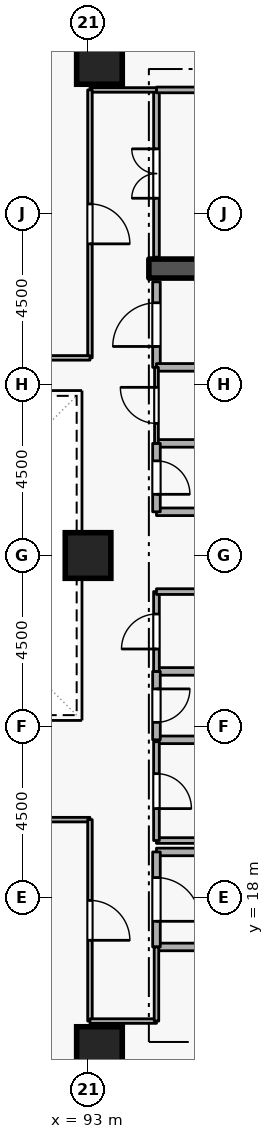
"""IFC4 building model, lengths in metres.
Left out: names, types, materials, properties, quantities, classifications, styles, units other than length and angle.
Written with IfcOpenShell. Run it as: python <this file> out.ifc"""

import sys

from ifc_helpers import new_model, si_unit, direction, frame, frame_2d, origin, origin_2d, place, context, subcontext, project, spatial, rectangle, extrude, element, fill, save


model = new_model("IFC4")
c1 = context("Model", 3, precision=1e-05, world=origin(), true_north=direction((0.0, 1.0)))
c2 = subcontext(c1, "Body", "Model", "MODEL_VIEW")
j1 = project(units=[si_unit("LENGTHUNIT", "METRE"), si_unit("PLANEANGLEUNIT", "RADIAN")], contexts=[c1])
p1 = place(None, origin())
s1 = spatial("IfcSite", under=j1, at=p1, CompositionType="ELEMENT")
p2 = place(p1, origin())
s2 = spatial("IfcBuilding", under=s1, at=p2, CompositionType="ELEMENT")
p3 = place(p2, frame((0.0, 0.0, 119.7)))
s3 = spatial("IfcBuildingStorey", under=s2, at=p3, CompositionType="ELEMENT", Elevation=119.7)
p4 = place(p3, frame((94.6, 34.55, 0.0), z_axis=(0.0, 0.0, 1.0), x_axis=(1.0, 0.0, 0.0)))
e1 = element("IfcWall", 1, at=p4, inside=s3, PredefinedType="SHEAR", context=c2, shape_type="SweptSolid", body=[
    extrude(rectangle(XDim=5.8, YDim=0.5, at=frame_2d((2.9, 0.0))), origin(), (0.0, 0.0, 1.0), 3.6),
])
for number, where, z_axis, x_axis in (
    (2, (93.3, 14.0, 0.0), (0.0, 0.0, 1.0), (1.0, 0.0, 0.0)),
    (3, (93.3, 40.0, 0.0), (0.0, 0.0, 1.0), (1.0, 0.0, 0.0)),
    (4, (93.0, 27.0, 0.0), (0.0, 0.0, 1.0), (1.0, 0.0, 0.0)),
):
    element("IfcColumn", number, at=place(p3, frame(where, z_axis=z_axis, x_axis=x_axis)), inside=s3, PredefinedType="COLUMN", context=c2, shape_type="SweptSolid", body=[
        extrude(rectangle(XDim=1.2, YDim=1.2, at=origin_2d()), origin(), (0.0, 0.0, 1.0), 3.6),
    ])
p5 = place(p3, frame((94.8, 16.7, 0.0), z_axis=(0.0, 0.0, 1.0), x_axis=(1.0, 0.0, 0.0)))
e5 = element("IfcWall", 5, at=p5, inside=s3, PredefinedType="STANDARD", context=c2, shape_type="SweptSolid", body=[
    extrude(rectangle(XDim=5.7, YDim=0.2, at=frame_2d((2.85, 0.0))), origin(), (0.0, 0.0, 1.0), 3.32),
])
p6 = place(p3, frame((97.1, 19.2, 0.0), z_axis=(0.0, 0.0, 1.0), x_axis=(-1.0, 0.0, 0.0)))
e6 = element("IfcWall", 6, at=p6, inside=s3, PredefinedType="STANDARD", context=c2, shape_type="SweptSolid", body=[
    extrude(rectangle(XDim=2.3, YDim=0.2, at=frame_2d((1.15, 0.0))), origin(), (0.0, 0.0, 1.0), 2.525),
])
p7 = place(p3, frame((94.8, 19.2, 0.0), z_axis=(0.0, 0.0, 1.0), x_axis=(0.0, -1.0, 0.0)))
e7 = element("IfcWall", 7, at=p7, inside=s3, PredefinedType="STANDARD", context=c2, shape_type="SweptSolid", body=[
    extrude(rectangle(XDim=2.5, YDim=0.2, at=frame_2d((1.25, 0.0))), origin(), (0.0, 0.0, 1.0), 3.32),
])
p8 = place(p7, frame((0.675, 0.0, 0.0)))
e8 = element("IfcOpeningElement", 8, at=p8, cuts=e7, PredefinedType="OPENING", context=c2, shape_type="SweptSolid", body=[
    extrude(rectangle(XDim=1.15, YDim=2.1, at=frame_2d((0.575, 1.05))), frame((0.0, 0.11, 0.0), z_axis=(0.0, -1.0, 0.0), x_axis=(1.0, 0.0, 0.0)), (0.0, 0.0, 1.0), 0.22),
])
for number, where, z_axis, x_axis in (
    (9, (94.8, 28.15, 0.0), (0.0, 0.0, 1.0), (1.0, 0.0, 0.0)),
    (10, (96.85, 29.95, 0.0), (0.0, 0.0, 1.0), (-1.0, 0.0, 0.0)),
):
    element("IfcWall", number, at=place(p3, frame(where, z_axis=z_axis, x_axis=x_axis)), inside=s3, PredefinedType="STANDARD", context=c2, shape_type="SweptSolid", body=[
        extrude(rectangle(XDim=2.05, YDim=0.2, at=frame_2d((1.025, 0.0))), origin(), (0.0, 0.0, 1.0), 3.32),
    ])
p9 = place(p3, frame((94.8, 29.95, 0.0), z_axis=(0.0, 0.0, 1.0), x_axis=(0.0, -1.0, 0.0)))
e11 = element("IfcWall", 11, at=p9, inside=s3, PredefinedType="STANDARD", context=c2, shape_type="SweptSolid", body=[
    extrude(rectangle(XDim=1.8, YDim=0.2, at=frame_2d((0.9, 0.0))), origin(), (0.0, 0.0, 1.0), 3.32),
])
p10 = place(p9, frame((0.46, 0.0, 0.0)))
e12 = element("IfcOpeningElement", 12, at=p10, cuts=e11, PredefinedType="OPENING", context=c2, shape_type="SweptSolid", body=[
    extrude(rectangle(XDim=0.88, YDim=2.04, at=frame_2d((0.44, 1.02))), frame((0.0, 0.11, 0.0), z_axis=(0.0, -1.0, 0.0), x_axis=(1.0, 0.0, 0.0)), (0.0, 0.0, 1.0), 0.22),
])
for number, where, z_axis, x_axis in (
    (13, (94.8, 22.15, 0.0), (0.0, 0.0, 1.0), (1.0, 0.0, 0.0)),
    (14, (96.85, 23.95, 0.0), (0.0, 0.0, 1.0), (-1.0, 0.0, 0.0)),
):
    element("IfcWall", number, at=place(p3, frame(where, z_axis=z_axis, x_axis=x_axis)), inside=s3, PredefinedType="STANDARD", context=c2, shape_type="SweptSolid", body=[
        extrude(rectangle(XDim=2.05, YDim=0.2, at=frame_2d((1.025, 0.0))), origin(), (0.0, 0.0, 1.0), 3.32),
    ])
p11 = place(p3, frame((94.8, 23.95, 0.0), z_axis=(0.0, 0.0, 1.0), x_axis=(0.0, -1.0, 0.0)))
e15 = element("IfcWall", 15, at=p11, inside=s3, PredefinedType="STANDARD", context=c2, shape_type="SweptSolid", body=[
    extrude(rectangle(XDim=1.8, YDim=0.2, at=frame_2d((0.9, 0.0))), origin(), (0.0, 0.0, 1.0), 3.32),
])
p12 = place(p11, frame((0.46, 0.0, 0.0)))
e16 = element("IfcOpeningElement", 16, at=p12, cuts=e15, PredefinedType="OPENING", context=c2, shape_type="SweptSolid", body=[
    extrude(rectangle(XDim=0.88, YDim=2.04, at=frame_2d((0.44, 1.02))), frame((0.0, 0.11, 0.0), z_axis=(0.0, -1.0, 0.0), x_axis=(1.0, 0.0, 0.0)), (0.0, 0.0, 1.0), 0.22),
])
p13 = place(p3, frame((94.8, 31.95, 0.0), z_axis=(0.0, 0.0, 1.0), x_axis=(0.0, 1.0, 0.0)))
e17 = element("IfcWall", 17, at=p13, inside=s3, PredefinedType="STANDARD", context=c2, shape_type="SweptSolid", body=[
    extrude(rectangle(XDim=2.25, YDim=0.2, at=frame_2d((1.125, 0.0))), origin(), (0.0, 0.0, 1.0), 3.32),
])
p14 = place(p13, frame((0.55, 0.0, 0.0)))
e18 = element("IfcOpeningElement", 18, at=p14, cuts=e17, PredefinedType="OPENING", context=c2, shape_type="SweptSolid", body=[
    extrude(rectangle(XDim=1.15, YDim=2.1, at=frame_2d((0.575, 1.05))), frame((0.0, 0.11, 0.0), z_axis=(0.0, -1.0, 0.0), x_axis=(1.0, 0.0, 0.0)), (0.0, 0.0, 1.0), 0.22),
])
p15 = place(p3, frame((96.85, 31.95, 0.0), z_axis=(0.0, 0.0, 1.0), x_axis=(-1.0, 0.0, 0.0)))
e19 = element("IfcWall", 19, at=p15, inside=s3, PredefinedType="STANDARD", context=c2, shape_type="SweptSolid", body=[
    extrude(rectangle(XDim=2.05, YDim=0.2, at=frame_2d((1.025, 0.0))), origin(), (0.0, 0.0, 1.0), 3.32),
])
p16 = place(p3, frame((94.8, 19.5, 0.0), z_axis=(0.0, 0.0, 1.0), x_axis=(1.0, 0.0, 0.0)))
e20 = element("IfcWall", 20, at=p16, inside=s3, PredefinedType="PARTITIONING", context=c2, shape_type="SweptSolid", body=[
    extrude(rectangle(XDim=2.05, YDim=0.15, at=frame_2d((1.025, 0.0))), origin(), (0.0, 0.0, 1.0), 2.525),
])
p17 = place(p3, frame((94.8, 22.1, 0.0), z_axis=(0.0, 0.0, 1.0), x_axis=(0.0, -1.0, 0.0)))
e21 = element("IfcWall", 21, at=p17, inside=s3, PredefinedType="PARTITIONING", context=c2, shape_type="SweptSolid", body=[
    extrude(rectangle(XDim=2.6, YDim=0.15, at=frame_2d((1.3, 0.0))), origin(), (0.0, 0.0, 1.0), 3.32),
])
p18 = place(p17, frame((0.84, 0.0, 0.0)))
e22 = element("IfcOpeningElement", 22, at=p18, cuts=e21, PredefinedType="OPENING", context=c2, shape_type="SweptSolid", body=[
    extrude(rectangle(XDim=0.92, YDim=2.08, at=frame_2d((0.46, 1.04))), frame((0.0, 0.085, 0.0), z_axis=(0.0, -1.0, 0.0), x_axis=(1.0, 0.0, 0.0)), (0.0, 0.0, 1.0), 0.17),
])
p19 = place(p3, frame((94.8, 23.95, 0.0), z_axis=(0.0, 0.0, 1.0), x_axis=(0.0, 1.0, 0.0)))
e23 = element("IfcWall", 23, at=p19, inside=s3, PredefinedType="PARTITIONING", context=c2, shape_type="SweptSolid", body=[
    extrude(rectangle(XDim=2.1, YDim=0.15, at=frame_2d((1.05, 0.0))), origin(), (0.0, 0.0, 1.0), 3.32),
])
p20 = place(p19, frame((0.59, 0.0, 0.0)))
e24 = element("IfcOpeningElement", 24, at=p20, cuts=e23, PredefinedType="OPENING", context=c2, shape_type="SweptSolid", body=[
    extrude(rectangle(XDim=0.92, YDim=2.08, at=frame_2d((0.46, 1.04))), frame((0.0, 0.085, 0.0), z_axis=(0.0, -1.0, 0.0), x_axis=(1.0, 0.0, 0.0)), (0.0, 0.0, 1.0), 0.17),
])
p21 = place(p3, frame((94.8, 26.05, 0.0), z_axis=(0.0, 0.0, 1.0), x_axis=(1.0, 0.0, 0.0)))
e25 = element("IfcWall", 25, at=p21, inside=s3, PredefinedType="PARTITIONING", context=c2, shape_type="SweptSolid", body=[
    extrude(rectangle(XDim=2.05, YDim=0.15, at=frame_2d((1.025, 0.0))), origin(), (0.0, 0.0, 1.0), 3.32),
])
p22 = place(p3, frame((94.8, 29.95, 0.0), z_axis=(0.0, 0.0, 1.0), x_axis=(0.0, 1.0, 0.0)))
e26 = element("IfcWall", 26, at=p22, inside=s3, PredefinedType="PARTITIONING", context=c2, shape_type="SweptSolid", body=[
    extrude(rectangle(XDim=2.0, YDim=0.1, at=frame_2d((1.0, 0.0))), origin(), (0.0, 0.0, 1.0), 3.32),
])
p23 = place(p22, frame((0.525, 0.0, 0.0)))
e27 = element("IfcOpeningElement", 27, at=p23, cuts=e26, PredefinedType="OPENING", context=c2, shape_type="SweptSolid", body=[
    extrude(rectangle(XDim=0.95, YDim=2.1, at=frame_2d((0.475, 1.05))), frame((0.0, 0.06, 0.0), z_axis=(0.0, -1.0, 0.0), x_axis=(1.0, 0.0, 0.0)), (0.0, 0.0, 1.0), 0.12),
])
p24 = place(p3, frame((94.8, 34.85, 0.0), z_axis=(0.0, 0.0, 1.0), x_axis=(0.0, 1.0, 0.0)))
e28 = element("IfcWall", 28, at=p24, inside=s3, PredefinedType="PARTITIONING", context=c2, shape_type="SweptSolid", body=[
    extrude(rectangle(XDim=4.4, YDim=0.15, at=frame_2d((2.2, 0.0))), origin(), (0.0, 0.0, 1.0), 3.32),
])
p25 = place(p24, frame((1.55, 0.0, 0.0)))
e29 = element("IfcOpeningElement", 29, at=p25, cuts=e28, PredefinedType="OPENING", context=c2, shape_type="SweptSolid", body=[
    extrude(rectangle(XDim=1.3, YDim=2.12, at=frame_2d((0.65, 1.06))), frame((0.0, 0.085, 0.0), z_axis=(0.0, -1.0, 0.0), x_axis=(1.0, 0.0, 0.0)), (0.0, 0.0, 1.0), 0.17),
])
p26 = place(p3, frame((94.8, 39.25, 0.0), z_axis=(0.0, 0.0, 1.0), x_axis=(1.0, 0.0, 0.0)))
e30 = element("IfcWall", 30, at=p26, inside=s3, PredefinedType="PARTITIONING", context=c2, shape_type="SweptSolid", body=[
    extrude(rectangle(XDim=2.9, YDim=0.15, at=frame_2d((1.45, 0.0))), origin(), (0.0, 0.0, 1.0), 3.32),
])
p27 = place(p3, frame((88.5, 20.05, 0.0), z_axis=(0.0, 0.0, 1.0), x_axis=(1.0, 0.0, 0.0)))
e31 = element("IfcWall", 31, at=p27, inside=s3, PredefinedType="PARTITIONING", context=c2, shape_type="SweptSolid", body=[
    extrude(rectangle(XDim=4.55, YDim=0.12, at=frame_2d((2.275, 0.0))), origin(), (0.0, 0.0, 1.0), 3.32),
])
p28 = place(p3, frame((93.05, 20.05, 0.0), z_axis=(0.0, 0.0, 1.0), x_axis=(0.0, -1.0, 0.0)))
e32 = element("IfcWall", 32, at=p28, inside=s3, PredefinedType="PARTITIONING", context=c2, shape_type="SweptSolid", body=[
    extrude(rectangle(XDim=5.3, YDim=0.12, at=frame_2d((2.65, 0.0))), origin(), (0.0, 0.0, 1.0), 3.32),
])
p29 = place(p28, frame((2.125, 0.0, 0.0)))
e33 = element("IfcOpeningElement", 33, at=p29, cuts=e32, PredefinedType="OPENING", context=c2, shape_type="SweptSolid", body=[
    extrude(rectangle(XDim=1.05, YDim=2.1, at=frame_2d((0.525, 1.05))), frame((0.0, 0.07, 0.0), z_axis=(0.0, -1.0, 0.0), x_axis=(1.0, 0.0, 0.0)), (0.0, 0.0, 1.0), 0.14),
])
p30 = place(p3, frame((93.05, 14.75, 0.0), z_axis=(0.0, 0.0, 1.0), x_axis=(1.0, 0.0, 0.0)))
e34 = element("IfcWall", 34, at=p30, inside=s3, PredefinedType="PARTITIONING", context=c2, shape_type="SweptSolid", body=[
    extrude(rectangle(XDim=1.75, YDim=0.12, at=frame_2d((0.875, 0.0))), origin(), (0.0, 0.0, 1.0), 3.32),
])
p31 = place(p3, frame((94.8, 14.75, 0.0), z_axis=(0.0, 0.0, 1.0), x_axis=(0.0, 1.0, 0.0)))
e35 = element("IfcWall", 35, at=p31, inside=s3, PredefinedType="PARTITIONING", context=c2, shape_type="SweptSolid", body=[
    extrude(rectangle(XDim=1.95, YDim=0.12, at=frame_2d((0.975, 0.0))), origin(), (0.0, 0.0, 1.0), 3.32),
])
p32 = place(p3, frame((94.8, 39.25, 0.0), z_axis=(0.0, 0.0, 1.0), x_axis=(-1.0, 0.0, 0.0)))
e36 = element("IfcWall", 36, at=p32, inside=s3, PredefinedType="PARTITIONING", context=c2, shape_type="SweptSolid", body=[
    extrude(rectangle(XDim=1.75, YDim=0.12, at=frame_2d((0.875, 0.0))), origin(), (0.0, 0.0, 1.0), 3.32),
])
p33 = place(p3, frame((93.05, 39.25, 0.0), z_axis=(0.0, 0.0, 1.0), x_axis=(0.0, -1.0, 0.0)))
e37 = element("IfcWall", 37, at=p33, inside=s3, PredefinedType="PARTITIONING", context=c2, shape_type="SweptSolid", body=[
    extrude(rectangle(XDim=7.05, YDim=0.12, at=frame_2d((3.525, 0.0))), origin(), (0.0, 0.0, 1.0), 3.32),
])
p34 = place(p33, frame((3.0, 0.0, 0.0)))
e38 = element("IfcOpeningElement", 38, at=p34, cuts=e37, PredefinedType="OPENING", context=c2, shape_type="SweptSolid", body=[
    extrude(rectangle(XDim=1.05, YDim=2.1, at=frame_2d((0.525, 1.05))), frame((0.0, 0.07, 0.0), z_axis=(0.0, -1.0, 0.0), x_axis=(1.0, 0.0, 0.0)), (0.0, 0.0, 1.0), 0.14),
])
p35 = place(p3, frame((93.05, 32.2, 0.0), z_axis=(0.0, 0.0, 1.0), x_axis=(-1.0, 0.0, 0.0)))
e39 = element("IfcWall", 39, at=p35, inside=s3, PredefinedType="PARTITIONING", context=c2, shape_type="SweptSolid", body=[
    extrude(rectangle(XDim=4.55, YDim=0.12, at=frame_2d((2.275, 0.0))), origin(), (0.0, 0.0, 1.0), 3.32),
])
p36 = place(p8, origin())
e40 = element("IfcDoor", 40, at=p36, inside=s3, OperationType="SINGLE_SWING_RIGHT", PredefinedType="DOOR", context=c2, shape_type="SweptSolid", body=[
    extrude(rectangle(XDim=1.15, YDim=2.1, at=frame_2d((0.575, 1.05))), frame((0.0, 0.025, 0.0), z_axis=(0.0, -1.0, 0.0), x_axis=(1.0, 0.0, 0.0)), (0.0, 0.0, 1.0), 0.05),
])
fill(e8, e40)
p37 = place(p10, origin())
e41 = element("IfcDoor", 41, at=p37, inside=s3, OperationType="SINGLE_SWING_RIGHT", PredefinedType="DOOR", context=c2, shape_type="SweptSolid", body=[
    extrude(rectangle(XDim=0.88, YDim=2.04, at=frame_2d((0.44, 1.02))), frame((0.0, 0.025, 0.0), z_axis=(0.0, -1.0, 0.0), x_axis=(1.0, 0.0, 0.0)), (0.0, 0.0, 1.0), 0.05),
])
fill(e12, e41)
p38 = place(p12, origin())
e42 = element("IfcDoor", 42, at=p38, inside=s3, OperationType="SINGLE_SWING_LEFT", PredefinedType="DOOR", context=c2, shape_type="SweptSolid", body=[
    extrude(rectangle(XDim=0.88, YDim=2.04, at=frame_2d((0.44, 1.02))), frame((0.0, 0.025, 0.0), z_axis=(0.0, -1.0, 0.0), x_axis=(1.0, 0.0, 0.0)), (0.0, 0.0, 1.0), 0.05),
])
fill(e16, e42)
p39 = place(p18, origin())
e43 = element("IfcDoor", 43, at=p39, inside=s3, OperationType="SINGLE_SWING_RIGHT", PredefinedType="DOOR", context=c2, shape_type="SweptSolid", body=[
    extrude(rectangle(XDim=0.92, YDim=2.08, at=frame_2d((0.46, 1.04))), frame((0.0, 0.025, 0.0), z_axis=(0.0, -1.0, 0.0), x_axis=(1.0, 0.0, 0.0)), (0.0, 0.0, 1.0), 0.05),
])
fill(e22, e43)
p40 = place(p20, origin())
e44 = element("IfcDoor", 44, at=p40, inside=s3, OperationType="SINGLE_SWING_LEFT", PredefinedType="DOOR", context=c2, shape_type="SweptSolid", body=[
    extrude(rectangle(XDim=0.92, YDim=2.08, at=frame_2d((0.46, 1.04))), frame((0.0, 0.025, 0.0), z_axis=(0.0, -1.0, 0.0), x_axis=(1.0, 0.0, 0.0)), (0.0, 0.0, 1.0), 0.05),
])
fill(e24, e44)
p41 = place(p23, origin())
e45 = element("IfcDoor", 45, at=p41, inside=s3, OperationType="SINGLE_SWING_RIGHT", PredefinedType="DOOR", context=c2, shape_type="SweptSolid", body=[
    extrude(rectangle(XDim=0.95, YDim=2.1, at=frame_2d((0.475, 1.05))), frame((0.0, 0.025, 0.0), z_axis=(0.0, -1.0, 0.0), x_axis=(1.0, 0.0, 0.0)), (0.0, 0.0, 1.0), 0.05),
])
fill(e27, e45)
p42 = place(p14, origin())
e46 = element("IfcDoor", 46, at=p42, inside=s3, OperationType="SINGLE_SWING_LEFT", PredefinedType="DOOR", context=c2, shape_type="SweptSolid", body=[
    extrude(rectangle(XDim=1.15, YDim=2.1, at=frame_2d((0.575, 1.05))), frame((0.0, 0.025, 0.0), z_axis=(0.0, -1.0, 0.0), x_axis=(1.0, 0.0, 0.0)), (0.0, 0.0, 1.0), 0.05),
])
fill(e18, e46)
p43 = place(p25, origin())
e47 = element("IfcDoor", 47, at=p43, inside=s3, OperationType="DOUBLE_DOOR_SINGLE_SWING", PredefinedType="DOOR", context=c2, shape_type="SweptSolid", body=[
    extrude(rectangle(XDim=1.3, YDim=2.12, at=frame_2d((0.65, 1.06))), frame((0.0, 0.025, 0.0), z_axis=(0.0, -1.0, 0.0), x_axis=(1.0, 0.0, 0.0)), (0.0, 0.0, 1.0), 0.05),
])
fill(e29, e47)
p44 = place(p29, origin())
e48 = element("IfcDoor", 48, at=p44, inside=s3, OperationType="SINGLE_SWING_RIGHT", PredefinedType="DOOR", context=c2, shape_type="SweptSolid", body=[
    extrude(rectangle(XDim=1.05, YDim=2.1, at=frame_2d((0.525, 1.05))), frame((0.0, 0.025, 0.0), z_axis=(0.0, -1.0, 0.0), x_axis=(1.0, 0.0, 0.0)), (0.0, 0.0, 1.0), 0.05),
])
fill(e33, e48)
p45 = place(p34, origin())
e49 = element("IfcDoor", 49, at=p45, inside=s3, OperationType="SINGLE_SWING_RIGHT", PredefinedType="DOOR", context=c2, shape_type="SweptSolid", body=[
    extrude(rectangle(XDim=1.05, YDim=2.1, at=frame_2d((0.525, 1.05))), frame((0.0, 0.025, 0.0), z_axis=(0.0, -1.0, 0.0), x_axis=(1.0, 0.0, 0.0)), (0.0, 0.0, 1.0), 0.05),
])
fill(e38, e49)
save(model, sys.argv[1])
